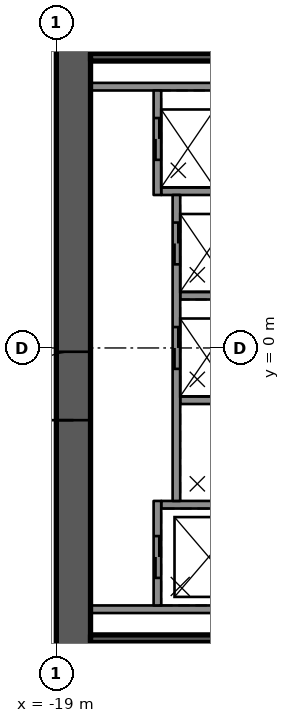
"""IFC4 building model, lengths in metres.
Left out: names, types, materials, properties, quantities, classifications, styles, units other than length and angle.
Written with IfcOpenShell. Run it as: python <this file> out.ifc"""

import sys

from ifc_helpers import new_model, si_unit, direction, frame, frame_2d, origin, place, context, subcontext, project, spatial, rectangle, extrude, element, fill, save


model = new_model("IFC4")
c1 = context("Model", 3, precision=1e-05, world=origin(), true_north=direction((0.0, 1.0)))
c2 = subcontext(c1, "Body", "Model", "MODEL_VIEW")
j1 = project(units=[si_unit("LENGTHUNIT", "METRE"), si_unit("PLANEANGLEUNIT", "RADIAN")], contexts=[c1])
p1 = place(None, origin())
s1 = spatial("IfcSite", under=j1, at=p1, CompositionType="ELEMENT")
p2 = place(p1, origin())
s2 = spatial("IfcBuilding", under=s1, at=p2, CompositionType="ELEMENT")
p3 = place(p2, frame((0.0, 0.0, 29.2)))
s3 = spatial("IfcBuildingStorey", under=s2, at=p3, CompositionType="ELEMENT", Elevation=29.2)
p4 = place(p3, frame((-18.55, -12.0, 0.0), z_axis=(0.0, 0.0, 1.0), x_axis=(0.0, 1.0, 0.0)))
e1 = element("IfcWall", 1, at=p4, inside=s3, PredefinedType="SHEAR", context=c2, shape_type="SweptSolid", body=[
    extrude(rectangle(XDim=24.0, YDim=0.9, at=frame_2d((12.0, 0.0))), origin(), (0.0, 0.0, 1.0), 4.1),
])
p5 = place(p4, frame((10.1, 0.0, 0.0)))
e2 = element("IfcOpeningElement", 2, at=p5, cuts=e1, PredefinedType="OPENING", context=c2, shape_type="SweptSolid", body=[
    extrude(rectangle(XDim=1.8, YDim=2.1, at=frame_2d((0.9, 1.05))), frame((0.0, 0.46, 0.0), z_axis=(0.0, -1.0, 0.0), x_axis=(1.0, 0.0, 0.0)), (0.0, 0.0, 1.0), 0.92),
])
for number, where, z_axis, x_axis in (
    (3, (-11.54, 6.875, 0.0), (0.0, 0.0, 1.0), (-1.0, 0.0, 0.0)),
    (4, (-11.54, -6.875, 0.0), (0.0, 0.0, 1.0), (-1.0, 0.0, 0.0)),
):
    element("IfcWall", number, at=place(p3, frame(where, z_axis=z_axis, x_axis=x_axis)), inside=s3, PredefinedType="SOLIDWALL", context=c2, shape_type="SweptSolid", body=[
        extrude(rectangle(XDim=6.56, YDim=0.2, at=frame_2d((3.28, 0.0))), origin(), (0.0, 0.0, 1.0), 3.68),
    ])
p6 = place(p3, frame((-11.54, -4.125, 0.0), z_axis=(0.0, 0.0, 1.0), x_axis=(-1.0, 0.0, 0.0)))
e5 = element("IfcWall", 5, at=p6, inside=s3, PredefinedType="SOLIDWALL", context=c2, shape_type="SweptSolid", body=[
    extrude(rectangle(XDim=4.7, YDim=0.2, at=frame_2d((2.35, 0.0))), origin(), (0.0, 0.0, 1.0), 3.68),
])
for number, where, z_axis, x_axis in (
    (6, (-11.54, -1.375, 0.0), (0.0, 0.0, 1.0), (-1.0, 0.0, 0.0)),
    (7, (-11.54, 1.375, 0.0), (0.0, 0.0, 1.0), (-1.0, 0.0, 0.0)),
):
    element("IfcWall", number, at=place(p3, frame(where, z_axis=z_axis, x_axis=x_axis)), inside=s3, PredefinedType="SOLIDWALL", context=c2, shape_type="SweptSolid", body=[
        extrude(rectangle(XDim=4.2, YDim=0.2, at=frame_2d((2.1, 0.0))), origin(), (0.0, 0.0, 1.0), 3.68),
    ])
p7 = place(p3, frame((-11.54, 4.125, 0.0), z_axis=(0.0, 0.0, 1.0), x_axis=(-1.0, 0.0, 0.0)))
e8 = element("IfcWall", 8, at=p7, inside=s3, PredefinedType="SOLIDWALL", context=c2, shape_type="SweptSolid", body=[
    extrude(rectangle(XDim=4.7, YDim=0.2, at=frame_2d((2.35, 0.0))), origin(), (0.0, 0.0, 1.0), 3.68),
])
p8 = place(p3, frame((-16.34, -6.775, 0.0), z_axis=(0.0, 0.0, 1.0), x_axis=(0.0, 1.0, 0.0)))
e9 = element("IfcWall", 9, at=p8, inside=s3, PredefinedType="SOLIDWALL", context=c2, shape_type="SweptSolid", body=[
    extrude(rectangle(XDim=2.75, YDim=0.2, at=frame_2d((1.375, 0.0))), origin(), (0.0, 0.0, 1.0), 3.68),
])
p9 = place(p8, frame((0.725, 0.0, 0.0)))
e10 = element("IfcOpeningElement", 10, at=p9, cuts=e9, PredefinedType="OPENING", context=c2, shape_type="SweptSolid", body=[
    extrude(rectangle(XDim=1.1, YDim=2.1, at=frame_2d((0.55, 1.05))), frame((0.0, 0.11, 0.0), z_axis=(0.0, -1.0, 0.0), x_axis=(1.0, 0.0, 0.0)), (0.0, 0.0, 1.0), 0.22),
])
p10 = place(p3, frame((-15.84, -4.025, 0.0), z_axis=(0.0, 0.0, 1.0), x_axis=(0.0, 1.0, 0.0)))
e11 = element("IfcWall", 11, at=p10, inside=s3, PredefinedType="SOLIDWALL", context=c2, shape_type="SweptSolid", body=[
    extrude(rectangle(XDim=8.05, YDim=0.2, at=frame_2d((4.025, 0.0))), origin(), (0.0, 0.0, 1.0), 3.68),
])
p11 = place(p10, frame((3.475, 0.0, 0.0)))
e12 = element("IfcOpeningElement", 12, at=p11, cuts=e11, PredefinedType="OPENING", context=c2, shape_type="SweptSolid", body=[
    extrude(rectangle(XDim=1.1, YDim=2.1, at=frame_2d((0.55, 1.05))), frame((0.0, 0.11, 0.0), z_axis=(0.0, -1.0, 0.0), x_axis=(1.0, 0.0, 0.0)), (0.0, 0.0, 1.0), 0.22),
])
p12 = place(p10, frame((6.225, 0.0, 0.0)))
e13 = element("IfcOpeningElement", 13, at=p12, cuts=e11, PredefinedType="OPENING", context=c2, shape_type="SweptSolid", body=[
    extrude(rectangle(XDim=1.1, YDim=2.1, at=frame_2d((0.55, 1.05))), frame((0.0, 0.11, 0.0), z_axis=(0.0, -1.0, 0.0), x_axis=(1.0, 0.0, 0.0)), (0.0, 0.0, 1.0), 0.22),
])
p13 = place(p3, frame((-16.34, 4.025, 0.0), z_axis=(0.0, 0.0, 1.0), x_axis=(0.0, 1.0, 0.0)))
e14 = element("IfcWall", 14, at=p13, inside=s3, PredefinedType="SOLIDWALL", context=c2, shape_type="SweptSolid", body=[
    extrude(rectangle(XDim=2.75, YDim=0.2, at=frame_2d((1.375, 0.0))), origin(), (0.0, 0.0, 1.0), 3.68),
])
p14 = place(p13, frame((0.925, 0.0, 0.0)))
e15 = element("IfcOpeningElement", 15, at=p14, cuts=e14, PredefinedType="OPENING", context=c2, shape_type="SweptSolid", body=[
    extrude(rectangle(XDim=1.1, YDim=2.1, at=frame_2d((0.55, 1.05))), frame((0.0, 0.11, 0.0), z_axis=(0.0, -1.0, 0.0), x_axis=(1.0, 0.0, 0.0)), (0.0, 0.0, 1.0), 0.22),
])
for number, where, z_axis, x_axis in (
    (16, (-11.54, 7.65, 0.0), (0.0, 0.0, 1.0), (-1.0, 0.0, 0.0)),
    (17, (-11.54, -7.65, 0.0), (0.0, 0.0, 1.0), (-1.0, 0.0, 0.0)),
):
    element("IfcWall", number, at=place(p3, frame(where, z_axis=z_axis, x_axis=x_axis)), inside=s3, PredefinedType="SOLIDWALL", context=c2, shape_type="SweptSolid", body=[
        extrude(rectangle(XDim=6.56, YDim=0.2, at=frame_2d((3.28, 0.0))), origin(), (0.0, 0.0, 1.0), 3.68),
    ])
p15 = place(p9, origin())
e18 = element("IfcDoor", 18, at=p15, inside=s3, OperationType="DOUBLE_DOOR_SLIDING", PredefinedType="DOOR", context=c2, shape_type="SweptSolid", body=[
    extrude(rectangle(XDim=1.1, YDim=2.1, at=frame_2d((0.55, 1.05))), frame((0.0, 0.025, 0.0), z_axis=(0.0, -1.0, 0.0), x_axis=(1.0, 0.0, 0.0)), (0.0, 0.0, 1.0), 0.05),
])
fill(e10, e18)
p16 = place(p11, origin())
e19 = element("IfcDoor", 19, at=p16, inside=s3, OperationType="DOUBLE_DOOR_SLIDING", PredefinedType="DOOR", context=c2, shape_type="SweptSolid", body=[
    extrude(rectangle(XDim=1.1, YDim=2.1, at=frame_2d((0.55, 1.05))), frame((0.0, 0.025, 0.0), z_axis=(0.0, -1.0, 0.0), x_axis=(1.0, 0.0, 0.0)), (0.0, 0.0, 1.0), 0.05),
])
fill(e12, e19)
p17 = place(p12, origin())
e20 = element("IfcDoor", 20, at=p17, inside=s3, OperationType="DOUBLE_DOOR_SLIDING", PredefinedType="DOOR", context=c2, shape_type="SweptSolid", body=[
    extrude(rectangle(XDim=1.1, YDim=2.1, at=frame_2d((0.55, 1.05))), frame((0.0, 0.025, 0.0), z_axis=(0.0, -1.0, 0.0), x_axis=(1.0, 0.0, 0.0)), (0.0, 0.0, 1.0), 0.05),
])
fill(e13, e20)
p18 = place(p14, origin())
e21 = element("IfcDoor", 21, at=p18, inside=s3, OperationType="DOUBLE_DOOR_SLIDING", PredefinedType="DOOR", context=c2, shape_type="SweptSolid", body=[
    extrude(rectangle(XDim=1.1, YDim=2.1, at=frame_2d((0.55, 1.05))), frame((0.0, 0.025, 0.0), z_axis=(0.0, -1.0, 0.0), x_axis=(1.0, 0.0, 0.0)), (0.0, 0.0, 1.0), 0.05),
])
fill(e15, e21)
p19 = place(p5, origin())
e22 = element("IfcDoor", 22, at=p19, inside=s3, OperationType="SINGLE_SWING_LEFT", PredefinedType="DOOR", context=c2, shape_type="SweptSolid", body=[
    extrude(rectangle(XDim=1.8, YDim=2.1, at=frame_2d((0.9, 1.05))), frame((0.0, 0.025, 0.0), z_axis=(0.0, -1.0, 0.0), x_axis=(1.0, 0.0, 0.0)), (0.0, 0.0, 1.0), 0.05),
])
fill(e2, e22)
save(model, sys.argv[1])
